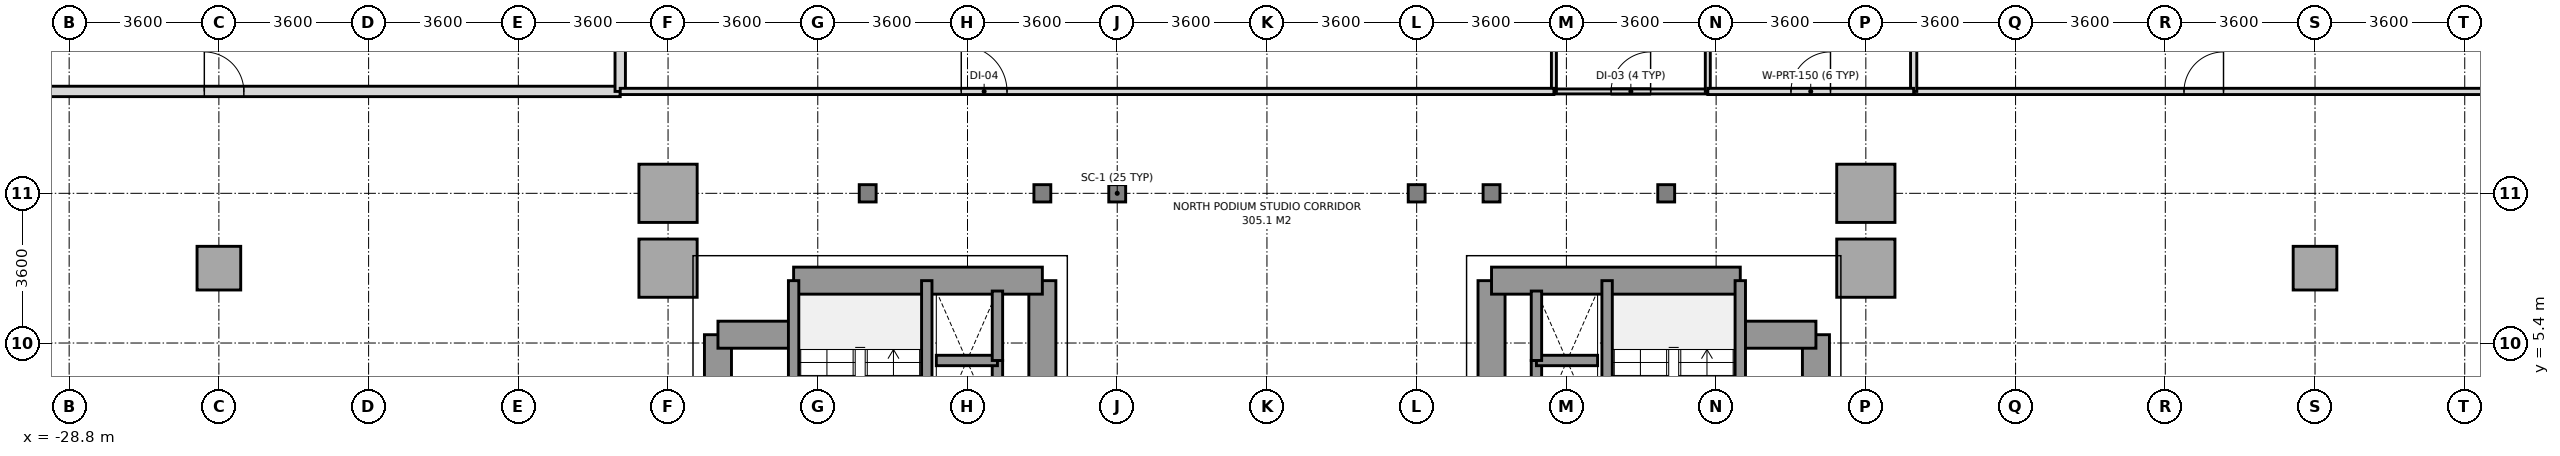
"""IFC4 building model, lengths in metres.
Left out: names, types, materials, properties, quantities, classifications, styles, units other than length and angle.
Written with IfcOpenShell. Run it as: python <this file> out.ifc"""

import sys

from ifc_helpers import new_model, si_unit, direction, frame, frame_2d, origin, origin_2d, place, context, subcontext, project, spatial, rectangle, i_section, extrude, source, transform, mapped, element, fill, save


model = new_model("IFC4")
c1 = context("Model", 3, precision=1e-05, world=origin(), true_north=direction((0.0, 1.0)))
c2 = subcontext(c1, "Body", "Model", "MODEL_VIEW")
j1 = project(units=[si_unit("LENGTHUNIT", "METRE"), si_unit("PLANEANGLEUNIT", "RADIAN")], contexts=[c1])
p1 = place(None, origin())
s1 = spatial("IfcSite", under=j1, at=p1, CompositionType="ELEMENT")
p2 = place(p1, origin())
s2 = spatial("IfcBuilding", under=s1, at=p2, CompositionType="ELEMENT")
p3 = place(p2, frame((0.0, 0.0, 20.4)))
s3 = spatial("IfcBuildingStorey", under=s2, at=p3, CompositionType="ELEMENT", Elevation=20.4)
m1 = source(origin(), c2, "Body", "SweptSolid", [
    extrude(rectangle(XDim=1.05, YDim=1.05, at=origin_2d()), origin(), (0.0, 0.0, 1.0), 4.48),
])
p4 = place(p3, frame((-25.2, 7.2, 0.0), z_axis=(0.0, 0.0, 1.0), x_axis=(1.0, 0.0, 0.0)))
e1 = element("IfcColumn", 1, at=p4, inside=s3, PredefinedType="COLUMN", context=c2, shape_type="MappedRepresentation", body=[
    mapped(m1, transform((0.0, 0.0, 0.0), x_axis=(1.0, 0.0, 0.0), y_axis=(0.0, 1.0, 0.0), z_axis=(0.0, 0.0, 1.0), scale=1.0)),
])
m2 = source(origin(), c2, "Body", "SweptSolid", [
    extrude(rectangle(XDim=1.4, YDim=1.4, at=origin_2d()), origin(), (0.0, 0.0, 1.0), 4.48),
])
for number, where, z_axis, x_axis in (
    (2, (-14.4, 7.2, 0.0), (0.0, 0.0, 1.0), (1.0, 0.0, 0.0)),
    (3, (-14.4, 9.0, 0.0), (0.0, 0.0, 1.0), (1.0, 0.0, 0.0)),
):
    element("IfcColumn", number, at=place(p3, frame(where, z_axis=z_axis, x_axis=x_axis)), inside=s3, PredefinedType="COLUMN", context=c2, shape_type="MappedRepresentation", body=[
        mapped(m2, transform((0.0, 0.0, 0.0), x_axis=(1.0, 0.0, 0.0), y_axis=(0.0, 1.0, 0.0), z_axis=(0.0, 0.0, 1.0), scale=1.0)),
    ])
m3 = source(origin(), c2, "Body", "SweptSolid", [
    extrude(i_section(OverallWidth=0.406, OverallDepth=0.416, WebThickness=0.024, FlangeThickness=0.039, at=origin_2d()), origin(), (0.0, 0.0, 1.0), 4.48),
])
for number, where, z_axis, x_axis in (
    (4, (-9.6, 9.0, 0.0), (0.0, 0.0, 1.0), (1.0, 0.0, 0.0)),
    (5, (-5.4, 9.0, 0.0), (0.0, 0.0, 1.0), (1.0, 0.0, 0.0)),
    (6, (-3.6, 9.0, 0.0), (0.0, 0.0, 1.0), (1.0, 0.0, 0.0)),
    (7, (3.6, 9.0, 0.0), (0.0, 0.0, 1.0), (1.0, 0.0, 0.0)),
    (8, (5.4, 9.0, 0.0), (0.0, 0.0, 1.0), (1.0, 0.0, 0.0)),
    (9, (9.6, 9.0, 0.0), (0.0, 0.0, 1.0), (1.0, 0.0, 0.0)),
):
    element("IfcColumn", number, at=place(p3, frame(where, z_axis=z_axis, x_axis=x_axis)), inside=s3, PredefinedType="COLUMN", context=c2, shape_type="MappedRepresentation", body=[
        mapped(m3, transform((0.0, 0.0, 0.0), x_axis=(1.0, 0.0, 0.0), y_axis=(0.0, 1.0, 0.0), z_axis=(0.0, 0.0, 1.0), scale=1.0)),
    ])
for number, where, z_axis, x_axis in (
    (10, (14.4, 7.2, 0.0), (0.0, 0.0, 1.0), (1.0, 0.0, 0.0)),
    (11, (14.4, 9.0, 0.0), (0.0, 0.0, 1.0), (1.0, 0.0, 0.0)),
):
    element("IfcColumn", number, at=place(p3, frame(where, z_axis=z_axis, x_axis=x_axis)), inside=s3, PredefinedType="COLUMN", context=c2, shape_type="MappedRepresentation", body=[
        mapped(m2, transform((0.0, 0.0, 0.0), x_axis=(1.0, 0.0, 0.0), y_axis=(0.0, 1.0, 0.0), z_axis=(0.0, 0.0, 1.0), scale=1.0)),
    ])
p5 = place(p3, frame((25.2, 7.2, 0.0), z_axis=(0.0, 0.0, 1.0), x_axis=(1.0, 0.0, 0.0)))
e12 = element("IfcColumn", 12, at=p5, inside=s3, PredefinedType="COLUMN", context=c2, shape_type="MappedRepresentation", body=[
    mapped(m1, transform((0.0, 0.0, 0.0), x_axis=(1.0, 0.0, 0.0), y_axis=(0.0, 1.0, 0.0), z_axis=(0.0, 0.0, 1.0), scale=1.0)),
])
p6 = place(p3, frame((-13.2, -5.6, 0.0), z_axis=(0.0, 0.0, 1.0), x_axis=(0.0, 1.0, 0.0)))
e13 = element("IfcWall", 13, at=p6, inside=s3, PredefinedType="SHEAR", context=c2, shape_type="SweptSolid", body=[
    extrude(rectangle(XDim=11.2, YDim=0.65, at=frame_2d((5.6, 0.0))), origin(), (0.0, 0.0, 1.0), 4.48),
])
p7 = place(p3, frame((-5.4, -5.6, 0.0), z_axis=(0.0, 0.0, 1.0), x_axis=(0.0, 1.0, 0.0)))
e14 = element("IfcWall", 14, at=p7, inside=s3, PredefinedType="SHEAR", context=c2, shape_type="SweptSolid", body=[
    extrude(rectangle(XDim=12.5, YDim=0.65, at=frame_2d((6.25, 0.0))), origin(), (0.0, 0.0, 1.0), 4.48),
])
p8 = place(p7, frame((4.55, 0.0, 0.0)))
e15 = element("IfcOpeningElement", 15, at=p8, cuts=e14, PredefinedType="OPENING", context=c2, shape_type="SweptSolid", body=[
    extrude(rectangle(XDim=1.2, YDim=2.2, at=frame_2d((0.6, 1.1))), frame((0.0, 0.335, 0.0), z_axis=(0.0, -1.0, 0.0), x_axis=(1.0, 0.0, 0.0)), (0.0, 0.0, 1.0), 0.67),
])
p9 = place(p7, frame((6.86, 0.0, 0.0)))
e16 = element("IfcOpeningElement", 16, at=p9, cuts=e14, PredefinedType="OPENING", context=c2, shape_type="SweptSolid", body=[
    extrude(rectangle(XDim=0.8, YDim=2.1, at=frame_2d((0.4, 1.05))), frame((0.0, 0.335, 0.0), z_axis=(0.0, -1.0, 0.0), x_axis=(1.0, 0.0, 0.0)), (0.0, 0.0, 1.0), 0.67),
])
p10 = place(p3, frame((-11.381, 6.9, 0.0), z_axis=(0.0, 0.0, 1.0), x_axis=(1.0, 0.0, 0.0)))
e17 = element("IfcWall", 17, at=p10, inside=s3, PredefinedType="SHEAR", context=c2, shape_type="SweptSolid", body=[
    extrude(rectangle(XDim=5.981, YDim=0.65, at=frame_2d((2.991, 0.0))), origin(), (0.0, 0.0, 1.0), 4.48),
])
p11 = place(p3, frame((-13.2, 5.6, 0.0), z_axis=(0.0, 0.0, 1.0), x_axis=(1.0, 0.0, 0.0)))
e18 = element("IfcWall", 18, at=p11, inside=s3, PredefinedType="SHEAR", context=c2, shape_type="SweptSolid", body=[
    extrude(rectangle(XDim=1.819, YDim=0.65, at=frame_2d((0.909, 0.0))), origin(), (0.0, 0.0, 1.0), 4.48),
])
p12 = place(p3, frame((-8.179, -0.041, 0.0), z_axis=(0.0, 0.0, 1.0), x_axis=(0.0, 1.0, 0.0)))
e19 = element("IfcWall", 19, at=p12, inside=s3, PredefinedType="SOLIDWALL", context=c2, shape_type="SweptSolid", body=[
    extrude(rectangle(XDim=6.941, YDim=0.25, at=frame_2d((3.47, 0.0))), origin(), (0.0, 0.0, 1.0), 4.48),
])
p13 = place(p12, frame((0.2, 0.0, 0.0)))
e20 = element("IfcOpeningElement", 20, at=p13, cuts=e19, PredefinedType="OPENING", context=c2, shape_type="SweptSolid", body=[
    extrude(rectangle(XDim=1.2, YDim=2.2, at=frame_2d((0.6, 1.1))), frame((0.0, 0.135, 0.0), z_axis=(0.0, -1.0, 0.0), x_axis=(1.0, 0.0, 0.0)), (0.0, 0.0, 1.0), 0.27),
])
p14 = place(p3, frame((-11.381, -0.041, 0.0), z_axis=(0.0, 0.0, 1.0), x_axis=(0.0, 1.0, 0.0)))
e21 = element("IfcWall", 21, at=p14, inside=s3, PredefinedType="SOLIDWALL", context=c2, shape_type="SweptSolid", body=[
    extrude(rectangle(XDim=6.941, YDim=0.25, at=frame_2d((3.47, 0.0))), origin(), (0.0, 0.0, 1.0), 4.48),
])
p15 = place(p3, frame((13.2, -5.6, 0.0), z_axis=(0.0, 0.0, 1.0), x_axis=(0.0, 1.0, 0.0)))
e22 = element("IfcWall", 22, at=p15, inside=s3, PredefinedType="SHEAR", context=c2, shape_type="SweptSolid", body=[
    extrude(rectangle(XDim=11.2, YDim=0.65, at=frame_2d((5.6, 0.0))), origin(), (0.0, 0.0, 1.0), 4.48),
])
p16 = place(p3, frame((5.4, -5.6, 0.0), z_axis=(0.0, 0.0, 1.0), x_axis=(0.0, 1.0, 0.0)))
e23 = element("IfcWall", 23, at=p16, inside=s3, PredefinedType="SHEAR", context=c2, shape_type="SweptSolid", body=[
    extrude(rectangle(XDim=12.5, YDim=0.65, at=frame_2d((6.25, 0.0))), origin(), (0.0, 0.0, 1.0), 4.48),
])
p17 = place(p16, frame((4.55, 0.0, 0.0)))
e24 = element("IfcOpeningElement", 24, at=p17, cuts=e23, PredefinedType="OPENING", context=c2, shape_type="SweptSolid", body=[
    extrude(rectangle(XDim=1.2, YDim=2.2, at=frame_2d((0.6, 1.1))), frame((0.0, 0.335, 0.0), z_axis=(0.0, -1.0, 0.0), x_axis=(1.0, 0.0, 0.0)), (0.0, 0.0, 1.0), 0.67),
])
p18 = place(p16, frame((6.86, 0.0, 0.0)))
e25 = element("IfcOpeningElement", 25, at=p18, cuts=e23, PredefinedType="OPENING", context=c2, shape_type="SweptSolid", body=[
    extrude(rectangle(XDim=0.8, YDim=2.1, at=frame_2d((0.4, 1.05))), frame((0.0, 0.335, 0.0), z_axis=(0.0, -1.0, 0.0), x_axis=(1.0, 0.0, 0.0)), (0.0, 0.0, 1.0), 0.67),
])
p19 = place(p16, frame((7.88, 0.0, 0.0)))
e26 = element("IfcOpeningElement", 26, at=p19, cuts=e23, PredefinedType="OPENING", context=c2, shape_type="SweptSolid", body=[
    extrude(rectangle(XDim=0.8, YDim=2.1, at=frame_2d((0.4, 1.05))), frame((0.0, 0.335, 0.0), z_axis=(0.0, -1.0, 0.0), x_axis=(1.0, 0.0, 0.0)), (0.0, 0.0, 1.0), 0.67),
])
p20 = place(p3, frame((5.4, 6.9, 0.0), z_axis=(0.0, 0.0, 1.0), x_axis=(1.0, 0.0, 0.0)))
e27 = element("IfcWall", 27, at=p20, inside=s3, PredefinedType="SHEAR", context=c2, shape_type="SweptSolid", body=[
    extrude(rectangle(XDim=5.981, YDim=0.65, at=frame_2d((2.991, 0.0))), origin(), (0.0, 0.0, 1.0), 4.48),
])
p21 = place(p3, frame((11.381, 5.6, 0.0), z_axis=(0.0, 0.0, 1.0), x_axis=(1.0, 0.0, 0.0)))
e28 = element("IfcWall", 28, at=p21, inside=s3, PredefinedType="SHEAR", context=c2, shape_type="SweptSolid", body=[
    extrude(rectangle(XDim=1.819, YDim=0.65, at=frame_2d((0.909, 0.0))), origin(), (0.0, 0.0, 1.0), 4.48),
])
p22 = place(p3, frame((8.179, -0.041, 0.0), z_axis=(0.0, 0.0, 1.0), x_axis=(0.0, 1.0, 0.0)))
e29 = element("IfcWall", 29, at=p22, inside=s3, PredefinedType="SOLIDWALL", context=c2, shape_type="SweptSolid", body=[
    extrude(rectangle(XDim=6.941, YDim=0.25, at=frame_2d((3.47, 0.0))), origin(), (0.0, 0.0, 1.0), 4.48),
])
p23 = place(p22, frame((0.2, 0.0, 0.0)))
e30 = element("IfcOpeningElement", 30, at=p23, cuts=e29, PredefinedType="OPENING", context=c2, shape_type="SweptSolid", body=[
    extrude(rectangle(XDim=1.2, YDim=2.2, at=frame_2d((0.6, 1.1))), frame((0.0, 0.135, 0.0), z_axis=(0.0, -1.0, 0.0), x_axis=(1.0, 0.0, 0.0)), (0.0, 0.0, 1.0), 0.27),
])
p24 = place(p3, frame((11.381, -0.041, 0.0), z_axis=(0.0, 0.0, 1.0), x_axis=(0.0, 1.0, 0.0)))
e31 = element("IfcWall", 31, at=p24, inside=s3, PredefinedType="SOLIDWALL", context=c2, shape_type="SweptSolid", body=[
    extrude(rectangle(XDim=6.941, YDim=0.25, at=frame_2d((3.47, 0.0))), origin(), (0.0, 0.0, 1.0), 4.48),
])
p25 = place(p3, frame((-6.48, 3.3, 0.0), z_axis=(0.0, 0.0, 1.0), x_axis=(0.0, 1.0, 0.0)))
e32 = element("IfcWall", 32, at=p25, inside=s3, PredefinedType="SOLIDWALL", context=c2, shape_type="SweptSolid", body=[
    extrude(rectangle(XDim=1.68, YDim=0.25, at=frame_2d((0.84, 0.0))), origin(), (0.0, 0.0, 1.0), 4.48),
])
p26 = place(p3, frame((-7.95, 4.98, 0.0), z_axis=(0.0, 0.0, 1.0), x_axis=(1.0, 0.0, 0.0)))
e33 = element("IfcWall", 33, at=p26, inside=s3, PredefinedType="SOLIDWALL", context=c2, shape_type="SweptSolid", body=[
    extrude(rectangle(XDim=1.47, YDim=0.25, at=frame_2d((0.735, 0.0))), origin(), (0.0, 0.0, 1.0), 4.48),
])
p27 = place(p3, frame((-6.48, 4.98, 0.0), z_axis=(0.0, 0.0, 1.0), x_axis=(0.0, 1.0, 0.0)))
e34 = element("IfcWall", 34, at=p27, inside=s3, PredefinedType="SOLIDWALL", context=c2, shape_type="SweptSolid", body=[
    extrude(rectangle(XDim=1.67, YDim=0.25, at=frame_2d((0.835, 0.0))), origin(), (0.0, 0.0, 1.0), 4.48),
])
p28 = place(p3, frame((6.48, 3.3, 0.0), z_axis=(0.0, 0.0, 1.0), x_axis=(0.0, 1.0, 0.0)))
e35 = element("IfcWall", 35, at=p28, inside=s3, PredefinedType="SOLIDWALL", context=c2, shape_type="SweptSolid", body=[
    extrude(rectangle(XDim=1.68, YDim=0.25, at=frame_2d((0.84, 0.0))), origin(), (0.0, 0.0, 1.0), 4.48),
])
p29 = place(p3, frame((6.48, 4.98, 0.0), z_axis=(0.0, 0.0, 1.0), x_axis=(1.0, 0.0, 0.0)))
e36 = element("IfcWall", 36, at=p29, inside=s3, PredefinedType="SOLIDWALL", context=c2, shape_type="SweptSolid", body=[
    extrude(rectangle(XDim=1.47, YDim=0.25, at=frame_2d((0.735, 0.0))), origin(), (0.0, 0.0, 1.0), 4.48),
])
p30 = place(p3, frame((6.48, 4.98, 0.0), z_axis=(0.0, 0.0, 1.0), x_axis=(0.0, 1.0, 0.0)))
e37 = element("IfcWall", 37, at=p30, inside=s3, PredefinedType="SOLIDWALL", context=c2, shape_type="SweptSolid", body=[
    extrude(rectangle(XDim=1.67, YDim=0.25, at=frame_2d((0.835, 0.0))), origin(), (0.0, 0.0, 1.0), 4.48),
])
p31 = place(p3, frame((6.9, 11.45, 0.0), z_axis=(0.0, 0.0, 1.0), x_axis=(1.0, 0.0, 0.0)))
e38 = element("IfcWall", 38, at=p31, inside=s3, PredefinedType="PARTITIONING", context=c2, shape_type="SweptSolid", body=[
    extrude(rectangle(XDim=3.7, YDim=0.12, at=frame_2d((1.85, 0.0))), origin(), (0.0, 0.0, 1.0), 4.48),
])
p32 = place(p31, frame((1.375, 0.0, 0.0)))
e39 = element("IfcOpeningElement", 39, at=p32, cuts=e38, PredefinedType="OPENING", context=c2, shape_type="SweptSolid", body=[
    extrude(rectangle(XDim=0.95, YDim=2.15, at=frame_2d((0.475, 1.075))), frame((0.0, 0.07, 0.0), z_axis=(0.0, -1.0, 0.0), x_axis=(1.0, 0.0, 0.0)), (0.0, 0.0, 1.0), 0.14),
])
p33 = place(p3, frame((6.9, 11.45, 0.0), z_axis=(0.0, 0.0, 1.0), x_axis=(0.0, 1.0, 0.0)))
e40 = element("IfcWall", 40, at=p33, inside=s3, PredefinedType="PARTITIONING", context=c2, shape_type="SweptSolid", body=[
    extrude(rectangle(XDim=3.73, YDim=0.12, at=frame_2d((1.865, 0.0))), origin(), (0.0, 0.0, 1.0), 3.13),
])
p34 = place(p3, frame((10.6, 11.45, 0.0), z_axis=(0.0, 0.0, 1.0), x_axis=(0.0, 1.0, 0.0)))
e41 = element("IfcWall", 41, at=p34, inside=s3, PredefinedType="PARTITIONING", context=c2, shape_type="SweptSolid", body=[
    extrude(rectangle(XDim=3.73, YDim=0.12, at=frame_2d((1.865, 0.0))), origin(), (0.0, 0.0, 1.0), 4.48),
])
p35 = place(p3, frame((-32.05, 11.45, 0.0), z_axis=(0.0, 0.0, 1.0), x_axis=(1.0, 0.0, 0.0)))
e42 = element("IfcWall", 42, at=p35, inside=s3, PredefinedType="SOLIDWALL", context=c2, shape_type="SweptSolid", body=[
    extrude(rectangle(XDim=16.5, YDim=0.25, at=frame_2d((8.25, 0.0))), origin(), (0.0, 0.0, 1.0), 4.48),
])
p36 = place(p35, frame((6.5, 0.0, 0.0)))
e43 = element("IfcOpeningElement", 43, at=p36, cuts=e42, PredefinedType="OPENING", context=c2, shape_type="SweptSolid", body=[
    extrude(rectangle(XDim=0.95, YDim=2.15, at=frame_2d((0.475, 1.075))), frame((0.0, 0.135, 0.0), z_axis=(0.0, -1.0, 0.0), x_axis=(1.0, 0.0, 0.0)), (0.0, 0.0, 1.0), 0.27),
])
p37 = place(p3, frame((-15.55, 11.45, 0.0), z_axis=(0.0, 0.0, 1.0), x_axis=(0.0, 1.0, 0.0)))
e44 = element("IfcWall", 44, at=p37, inside=s3, PredefinedType="SOLIDWALL", context=c2, shape_type="SweptSolid", body=[
    extrude(rectangle(XDim=11.6, YDim=0.25, at=frame_2d((5.8, 0.0))), origin(), (0.0, 0.0, 1.0), 4.48),
])
p38 = place(p3, frame((15.55, 11.45, 0.0), z_axis=(0.0, 0.0, 1.0), x_axis=(1.0, 0.0, 0.0)))
e45 = element("IfcWall", 45, at=p38, inside=s3, PredefinedType="PARTITIONING", context=c2, shape_type="SweptSolid", body=[
    extrude(rectangle(XDim=16.5, YDim=0.15, at=frame_2d((8.25, 0.0))), origin(), (0.0, 0.0, 1.0), 4.48),
])
p39 = place(p38, frame((6.5, 0.0, 0.0)))
e46 = element("IfcOpeningElement", 46, at=p39, cuts=e45, PredefinedType="OPENING", context=c2, shape_type="SweptSolid", body=[
    extrude(rectangle(XDim=0.95, YDim=2.15, at=frame_2d((0.475, 1.075))), frame((0.0, 0.085, 0.0), z_axis=(0.0, -1.0, 0.0), x_axis=(1.0, 0.0, 0.0)), (0.0, 0.0, 1.0), 0.17),
])
p40 = place(p3, frame((15.55, 11.45, 0.0), z_axis=(0.0, 0.0, 1.0), x_axis=(0.0, 1.0, 0.0)))
e47 = element("IfcWall", 47, at=p40, inside=s3, PredefinedType="PARTITIONING", context=c2, shape_type="SweptSolid", body=[
    extrude(rectangle(XDim=11.6, YDim=0.15, at=frame_2d((5.8, 0.0))), origin(), (0.0, 0.0, 1.0), 4.48),
])
p41 = place(p3, frame((-15.55, 11.45, 0.0), z_axis=(0.0, 0.0, 1.0), x_axis=(1.0, 0.0, 0.0)))
e48 = element("IfcWall", 48, at=p41, inside=s3, PredefinedType="PARTITIONING", context=c2, shape_type="SweptSolid", body=[
    extrude(rectangle(XDim=22.45, YDim=0.15, at=frame_2d((11.225, 0.0))), origin(), (0.0, 0.0, 1.0), 4.48),
])
p42 = place(p41, frame((8.2, 0.0, 0.0)))
e49 = element("IfcOpeningElement", 49, at=p42, cuts=e48, PredefinedType="OPENING", context=c2, shape_type="SweptSolid", body=[
    extrude(rectangle(XDim=1.1, YDim=2.2, at=frame_2d((0.55, 1.1))), frame((0.0, 0.085, 0.0), z_axis=(0.0, -1.0, 0.0), x_axis=(1.0, 0.0, 0.0)), (0.0, 0.0, 1.0), 0.17),
])
p43 = place(p3, frame((10.6, 11.45, 0.0), z_axis=(0.0, 0.0, 1.0), x_axis=(1.0, 0.0, 0.0)))
e50 = element("IfcWall", 50, at=p43, inside=s3, PredefinedType="PARTITIONING", context=c2, shape_type="SweptSolid", body=[
    extrude(rectangle(XDim=4.95, YDim=0.15, at=frame_2d((2.475, 0.0))), origin(), (0.0, 0.0, 1.0), 4.48),
])
p44 = place(p43, frame((2.0, 0.0, 0.0)))
e51 = element("IfcOpeningElement", 51, at=p44, cuts=e50, PredefinedType="OPENING", context=c2, shape_type="SweptSolid", body=[
    extrude(rectangle(XDim=0.95, YDim=2.15, at=frame_2d((0.475, 1.075))), frame((0.0, 0.085, 0.0), z_axis=(0.0, -1.0, 0.0), x_axis=(1.0, 0.0, 0.0)), (0.0, 0.0, 1.0), 0.17),
])
m4 = source(origin(), c2, "Body", "SweptSolid", [
    extrude(rectangle(XDim=0.95, YDim=2.15, at=frame_2d((0.475, 1.075))), frame((0.0, 0.025, 0.0), z_axis=(0.0, -1.0, 0.0), x_axis=(1.0, 0.0, 0.0)), (0.0, 0.0, 1.0), 0.05),
])
p45 = place(p32, origin())
e52 = element("IfcDoor", 52, at=p45, inside=s3, OperationType="SINGLE_SWING_RIGHT", PredefinedType="DOOR", context=c2, shape_type="MappedRepresentation", body=[
    mapped(m4, transform((0.0, 0.0, 0.0), x_axis=(1.0, 0.0, 0.0), y_axis=(0.0, 1.0, 0.0), z_axis=(0.0, 0.0, 1.0), scale=1.0)),
])
fill(e39, e52)
p46 = place(p36, origin())
e53 = element("IfcDoor", 53, at=p46, inside=s3, OperationType="SINGLE_SWING_LEFT", PredefinedType="DOOR", context=c2, shape_type="MappedRepresentation", body=[
    mapped(m4, transform((0.0, 0.0, 0.0), x_axis=(1.0, 0.0, 0.0), y_axis=(0.0, 1.0, 0.0), z_axis=(0.0, 0.0, 1.0), scale=1.0)),
])
fill(e43, e53)
p47 = place(p39, origin())
e54 = element("IfcDoor", 54, at=p47, inside=s3, OperationType="SINGLE_SWING_RIGHT", PredefinedType="DOOR", context=c2, shape_type="MappedRepresentation", body=[
    mapped(m4, transform((0.0, 0.0, 0.0), x_axis=(1.0, 0.0, 0.0), y_axis=(0.0, 1.0, 0.0), z_axis=(0.0, 0.0, 1.0), scale=1.0)),
])
fill(e46, e54)
m5 = source(origin(), c2, "Body", "SweptSolid", [
    extrude(rectangle(XDim=1.1, YDim=2.2, at=frame_2d((0.55, 1.1))), frame((0.0, 0.025, 0.0), z_axis=(0.0, -1.0, 0.0), x_axis=(1.0, 0.0, 0.0)), (0.0, 0.0, 1.0), 0.05),
])
p48 = place(p42, origin())
e55 = element("IfcDoor", 55, at=p48, inside=s3, OperationType="SINGLE_SWING_LEFT", PredefinedType="DOOR", context=c2, shape_type="MappedRepresentation", body=[
    mapped(m5, transform((0.0, 0.0, 0.0), x_axis=(1.0, 0.0, 0.0), y_axis=(0.0, 1.0, 0.0), z_axis=(0.0, 0.0, 1.0), scale=1.0)),
])
fill(e49, e55)
p49 = place(p44, origin())
e56 = element("IfcDoor", 56, at=p49, inside=s3, OperationType="SINGLE_SWING_RIGHT", PredefinedType="DOOR", context=c2, shape_type="MappedRepresentation", body=[
    mapped(m4, transform((0.0, 0.0, 0.0), x_axis=(1.0, 0.0, 0.0), y_axis=(0.0, 1.0, 0.0), z_axis=(0.0, 0.0, 1.0), scale=1.0)),
])
fill(e51, e56)
save(model, sys.argv[1])
